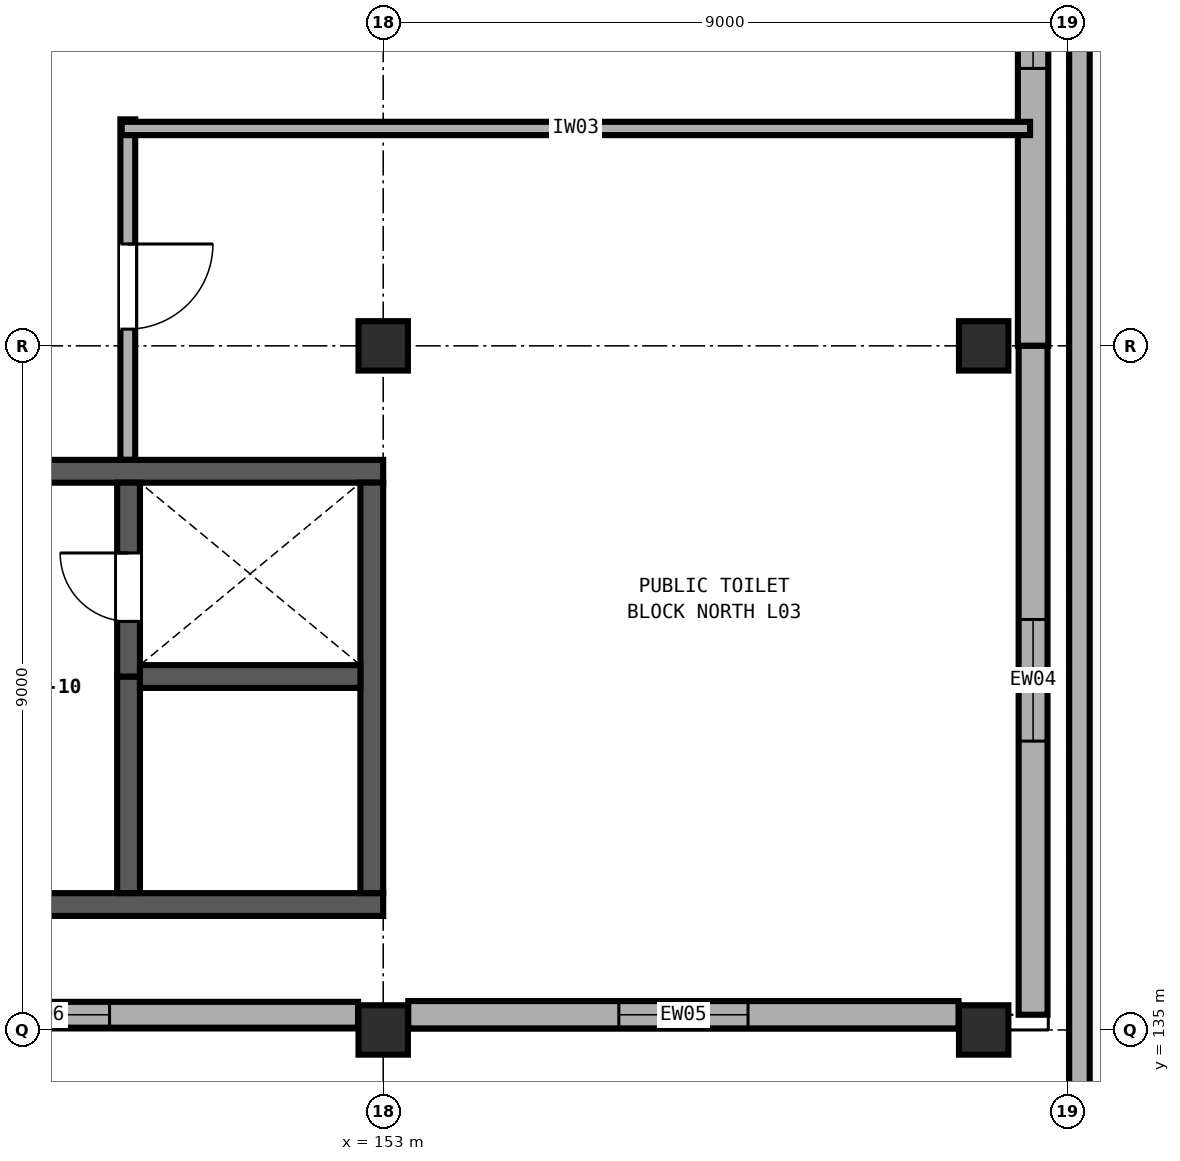
"""IFC4 building model, lengths in metres.
Left out: names, types, materials, properties, quantities, classifications, styles, units other than length and angle.
Written with IfcOpenShell. Run it as: python <this file> out.ifc"""

import sys

from ifc_helpers import new_model, si_unit, direction, frame, frame_2d, origin, origin_2d, place, context, subcontext, project, spatial, rectangle, extrude, element, fill, save


model = new_model("IFC4")
c1 = context("Model", 3, precision=1e-05, world=origin(), true_north=direction((0.0, 1.0)))
c2 = subcontext(c1, "Body", "Model", "MODEL_VIEW")
j1 = project(units=[si_unit("LENGTHUNIT", "METRE"), si_unit("PLANEANGLEUNIT", "RADIAN")], contexts=[c1])
p1 = place(None, origin())
s1 = spatial("IfcSite", under=j1, at=p1, CompositionType="ELEMENT")
p2 = place(p1, origin())
s2 = spatial("IfcBuilding", under=s1, at=p2, CompositionType="ELEMENT")
p3 = place(p2, frame((0.0, 0.0, 14.4)))
s3 = spatial("IfcBuildingStorey", under=s2, at=p3, CompositionType="ELEMENT", Elevation=14.4)
for number, where, z_axis, x_axis in (
    (1, (153.0, 135.0, 0.0), (0.0, 0.0, 1.0), (1.0, 0.0, 0.0)),
    (2, (153.0, 144.0, 0.0), (0.0, 0.0, 1.0), (1.0, 0.0, 0.0)),
    (3, (160.9, 135.0, 0.0), (0.0, 0.0, 1.0), (1.0, 0.0, 0.0)),
    (4, (160.9, 144.0, 0.0), (0.0, 0.0, 1.0), (1.0, 0.0, 0.0)),
):
    element("IfcColumn", number, at=place(p3, frame(where, z_axis=z_axis, x_axis=x_axis)), inside=s3, PredefinedType="COLUMN", context=c2, shape_type="SweptSolid", body=[
        extrude(rectangle(XDim=0.65, YDim=0.65, at=origin_2d()), origin(), (0.0, 0.0, 1.0), 4.8),
    ])
p4 = place(p3, frame((135.0, 136.65, 0.0), z_axis=(0.0, 0.0, 1.0), x_axis=(1.0, 0.0, 0.0)))
e5 = element("IfcWall", 5, at=p4, inside=s3, PredefinedType="SHEAR", context=c2, shape_type="SweptSolid", body=[
    extrude(rectangle(XDim=18.0, YDim=0.3, at=frame_2d((9.0, 0.0))), origin(), (0.0, 0.0, 1.0), 4.555),
])
p5 = place(p3, frame((153.0, 142.35, 0.0), z_axis=(0.0, 0.0, 1.0), x_axis=(-1.0, 0.0, 0.0)))
e6 = element("IfcWall", 6, at=p5, inside=s3, PredefinedType="SHEAR", context=c2, shape_type="SweptSolid", body=[
    extrude(rectangle(XDim=18.0, YDim=0.3, at=frame_2d((9.0, 0.0))), origin(), (0.0, 0.0, 1.0), 4.555),
])
p6 = place(p5, frame((4.7, 0.0, 0.0)))
e7 = element("IfcOpeningElement", 7, at=p6, cuts=e6, PredefinedType="OPENING", context=c2, shape_type="SweptSolid", body=[
    extrude(rectangle(XDim=1.9, YDim=2.25, at=frame_2d((0.95, 1.125))), frame((0.0, 0.16, 0.0), z_axis=(0.0, -1.0, 0.0), x_axis=(1.0, 0.0, 0.0)), (0.0, 0.0, 1.0), 0.32),
])
p7 = place(p3, frame((152.85, 136.8, 0.0), z_axis=(0.0, 0.0, 1.0), x_axis=(0.0, 1.0, 0.0)))
e8 = element("IfcWall", 8, at=p7, inside=s3, PredefinedType="SHEAR", context=c2, shape_type="SweptSolid", body=[
    extrude(rectangle(XDim=5.4, YDim=0.3, at=frame_2d((2.7, 0.0))), origin(), (0.0, 0.0, 1.0), 4.555),
])
p8 = place(p3, frame((149.65, 136.8, 0.0), z_axis=(0.0, 0.0, 1.0), x_axis=(0.0, 1.0, 0.0)))
e9 = element("IfcWall", 9, at=p8, inside=s3, PredefinedType="SHEAR", context=c2, shape_type="SweptSolid", body=[
    extrude(rectangle(XDim=2.85, YDim=0.3, at=frame_2d((1.425, 0.0))), origin(), (0.0, 0.0, 1.0), 4.555),
])
p9 = place(p3, frame((149.65, 139.65, 0.0), z_axis=(0.0, 0.0, 1.0), x_axis=(0.0, 1.0, 0.0)))
e10 = element("IfcWall", 10, at=p9, inside=s3, PredefinedType="SHEAR", context=c2, shape_type="SweptSolid", body=[
    extrude(rectangle(XDim=2.55, YDim=0.3, at=frame_2d((1.275, 0.0))), origin(), (0.0, 0.0, 1.0), 4.555),
])
p10 = place(p9, frame((0.725, 0.0, 0.0)))
e11 = element("IfcOpeningElement", 11, at=p10, cuts=e10, PredefinedType="OPENING", context=c2, shape_type="SweptSolid", body=[
    extrude(rectangle(XDim=0.9, YDim=2.1, at=frame_2d((0.45, 1.05))), frame((0.0, 0.16, 0.0), z_axis=(0.0, -1.0, 0.0), x_axis=(1.0, 0.0, 0.0)), (0.0, 0.0, 1.0), 0.32),
])
p11 = place(p3, frame((149.8, 139.65, 0.0), z_axis=(0.0, 0.0, 1.0), x_axis=(1.0, 0.0, 0.0)))
e12 = element("IfcWall", 12, at=p11, inside=s3, PredefinedType="SHEAR", context=c2, shape_type="SweptSolid", body=[
    extrude(rectangle(XDim=2.9, YDim=0.3, at=frame_2d((1.45, 0.0))), origin(), (0.0, 0.0, 1.0), 4.555),
])
p12 = place(p3, frame((161.55, 152.8, 0.0), z_axis=(0.0, 0.0, 1.0), x_axis=(0.0, -1.0, 0.0)))
e13 = element("IfcWall", 13, at=p12, inside=s3, PredefinedType="SOLIDWALL", context=c2, shape_type="SweptSolid", body=[
    extrude(rectangle(XDim=8.8, YDim=0.4, at=frame_2d((4.4, 0.0))), origin(), (0.0, 0.0, 1.0), 3.58),
])
p13 = place(p12, frame((3.65, 0.0, 0.9)))
e14 = element("IfcOpeningElement", 14, at=p13, cuts=e13, PredefinedType="OPENING", context=c2, shape_type="SweptSolid", body=[
    extrude(rectangle(XDim=1.5, YDim=1.6, at=frame_2d((0.75, 0.8))), frame((0.0, 0.21, 0.0), z_axis=(0.0, -1.0, 0.0), x_axis=(1.0, 0.0, 0.0)), (0.0, 0.0, 1.0), 0.42),
])
p14 = place(p3, frame((161.55, 144.0, 0.0), z_axis=(0.0, 0.0, 1.0), x_axis=(0.0, -1.0, 0.0)))
e15 = element("IfcWall", 15, at=p14, inside=s3, PredefinedType="SOLIDWALL", context=c2, shape_type="SweptSolid", body=[
    extrude(rectangle(XDim=8.8, YDim=0.38, at=frame_2d((4.4, 0.0))), origin(), (0.0, 0.0, 1.0), 3.58),
])
p15 = place(p14, frame((3.6, 0.0, 0.9)))
e16 = element("IfcOpeningElement", 16, at=p15, cuts=e15, PredefinedType="OPENING", context=c2, shape_type="SweptSolid", body=[
    extrude(rectangle(XDim=1.6, YDim=1.65, at=frame_2d((0.8, 0.825))), frame((0.0, 0.2, 0.0), z_axis=(0.0, -1.0, 0.0), x_axis=(1.0, 0.0, 0.0)), (0.0, 0.0, 1.0), 0.4),
])
p16 = place(p3, frame((160.57, 135.2, 0.0), z_axis=(0.0, 0.0, 1.0), x_axis=(-1.0, 0.0, 0.0)))
e17 = element("IfcWall", 17, at=p16, inside=s3, PredefinedType="SOLIDWALL", context=c2, shape_type="SweptSolid", body=[
    extrude(rectangle(XDim=7.24, YDim=0.36, at=frame_2d((3.62, 0.0))), origin(), (0.0, 0.0, 1.0), 3.58),
])
p17 = place(p16, frame((2.77, 0.0, 0.9)))
e18 = element("IfcOpeningElement", 18, at=p17, cuts=e17, PredefinedType="OPENING", context=c2, shape_type="SweptSolid", body=[
    extrude(rectangle(XDim=1.7, YDim=1.7, at=frame_2d((0.85, 0.85))), frame((0.0, 0.19, 0.0), z_axis=(0.0, -1.0, 0.0), x_axis=(1.0, 0.0, 0.0)), (0.0, 0.0, 1.0), 0.38),
])
p18 = place(p3, frame((152.67, 135.2, 0.0), z_axis=(0.0, 0.0, 1.0), x_axis=(-1.0, 0.0, 0.0)))
e19 = element("IfcWall", 19, at=p18, inside=s3, PredefinedType="SOLIDWALL", context=c2, shape_type="SweptSolid", body=[
    extrude(rectangle(XDim=8.34, YDim=0.34, at=frame_2d((4.17, 0.0))), origin(), (0.0, 0.0, 1.0), 3.58),
])
p19 = place(p18, frame((3.27, 0.0, 0.9)))
e20 = element("IfcOpeningElement", 20, at=p19, cuts=e19, PredefinedType="OPENING", context=c2, shape_type="SweptSolid", body=[
    extrude(rectangle(XDim=1.8, YDim=1.75, at=frame_2d((0.9, 0.875))), frame((0.0, 0.18, 0.0), z_axis=(0.0, -1.0, 0.0), x_axis=(1.0, 0.0, 0.0)), (0.0, 0.0, 1.0), 0.36),
])
p20 = place(p3, frame((162.16, 126.16, 0.0), z_axis=(0.0, 0.0, 1.0), x_axis=(0.0, 1.0, 0.0)))
e21 = element("IfcWall", 21, at=p20, inside=s3, PredefinedType="PARAPET", context=c2, shape_type="SweptSolid", body=[
    extrude(rectangle(XDim=26.68, YDim=0.27, at=frame_2d((13.34, 0.0))), origin(), (0.0, 0.0, 1.0), 0.65),
])
p21 = place(p3, frame((149.64, 146.98, 0.0), z_axis=(0.0, 0.0, 1.0), x_axis=(0.0, -1.0, 0.0)))
e22 = element("IfcWall", 22, at=p21, inside=s3, PredefinedType="PARTITIONING", context=c2, shape_type="SweptSolid", body=[
    extrude(rectangle(XDim=4.478, YDim=0.195, at=frame_2d((2.239, 0.0))), origin(), (0.0, 0.0, 1.0), 3.56),
])
p22 = place(p21, frame((1.64, 0.0, 0.0)))
e23 = element("IfcOpeningElement", 23, at=p22, cuts=e22, PredefinedType="OPENING", context=c2, shape_type="SweptSolid", body=[
    extrude(rectangle(XDim=1.12, YDim=2.22, at=frame_2d((0.56, 1.11))), frame((0.0, 0.107, 0.0), z_axis=(0.0, -1.0, 0.0), x_axis=(1.0, 0.0, 0.0)), (0.0, 0.0, 1.0), 0.215),
])
p23 = place(p3, frame((149.56, 146.86, 0.0), z_axis=(0.0, 0.0, 1.0), x_axis=(1.0, 0.0, 0.0)))
e24 = element("IfcWall", 24, at=p23, inside=s3, PredefinedType="PARTITIONING", context=c2, shape_type="SweptSolid", body=[
    extrude(rectangle(XDim=11.95, YDim=0.175, at=frame_2d((5.975, 0.0))), origin(), (0.0, 0.0, 1.0), 3.56),
])
p24 = place(p13, origin())
e25 = element("IfcWindow", 25, at=p24, inside=s3, PartitioningType="SINGLE_PANEL", PredefinedType="WINDOW", context=c2, shape_type="SweptSolid", body=[
    extrude(rectangle(XDim=1.5, YDim=1.6, at=frame_2d((0.75, 0.8))), frame((0.0, 0.03, 0.0), z_axis=(0.0, -1.0, 0.0), x_axis=(1.0, 0.0, 0.0)), (0.0, 0.0, 1.0), 0.06),
])
fill(e14, e25)
p25 = place(p15, origin())
e26 = element("IfcWindow", 26, at=p25, inside=s3, PartitioningType="SINGLE_PANEL", PredefinedType="WINDOW", context=c2, shape_type="SweptSolid", body=[
    extrude(rectangle(XDim=1.6, YDim=1.65, at=frame_2d((0.8, 0.825))), frame((0.0, 0.03, 0.0), z_axis=(0.0, -1.0, 0.0), x_axis=(1.0, 0.0, 0.0)), (0.0, 0.0, 1.0), 0.06),
])
fill(e16, e26)
p26 = place(p17, origin())
e27 = element("IfcWindow", 27, at=p26, inside=s3, PartitioningType="SINGLE_PANEL", PredefinedType="WINDOW", context=c2, shape_type="SweptSolid", body=[
    extrude(rectangle(XDim=1.7, YDim=1.7, at=frame_2d((0.85, 0.85))), frame((0.0, 0.03, 0.0), z_axis=(0.0, -1.0, 0.0), x_axis=(1.0, 0.0, 0.0)), (0.0, 0.0, 1.0), 0.06),
])
fill(e18, e27)
p27 = place(p19, origin())
e28 = element("IfcWindow", 28, at=p27, inside=s3, PartitioningType="DOUBLE_PANEL_VERTICAL", PredefinedType="WINDOW", context=c2, shape_type="SweptSolid", body=[
    extrude(rectangle(XDim=1.8, YDim=1.75, at=frame_2d((0.9, 0.875))), frame((0.0, 0.03, 0.0), z_axis=(0.0, -1.0, 0.0), x_axis=(1.0, 0.0, 0.0)), (0.0, 0.0, 1.0), 0.06),
])
fill(e20, e28)
p28 = place(p10, origin())
e29 = element("IfcDoor", 29, at=p28, inside=s3, OperationType="SINGLE_SWING_RIGHT", PredefinedType="DOOR", context=c2, shape_type="SweptSolid", body=[
    extrude(rectangle(XDim=0.9, YDim=2.1, at=frame_2d((0.45, 1.05))), frame((0.0, 0.025, 0.0), z_axis=(0.0, -1.0, 0.0), x_axis=(1.0, 0.0, 0.0)), (0.0, 0.0, 1.0), 0.05),
])
fill(e11, e29)
p29 = place(p22, origin())
e30 = element("IfcDoor", 30, at=p29, inside=s3, OperationType="SINGLE_SWING_LEFT", PredefinedType="DOOR", context=c2, shape_type="SweptSolid", body=[
    extrude(rectangle(XDim=1.12, YDim=2.22, at=frame_2d((0.56, 1.11))), frame((0.0, 0.025, 0.0), z_axis=(0.0, -1.0, 0.0), x_axis=(1.0, 0.0, 0.0)), (0.0, 0.0, 1.0), 0.05),
])
fill(e23, e30)
save(model, sys.argv[1])
